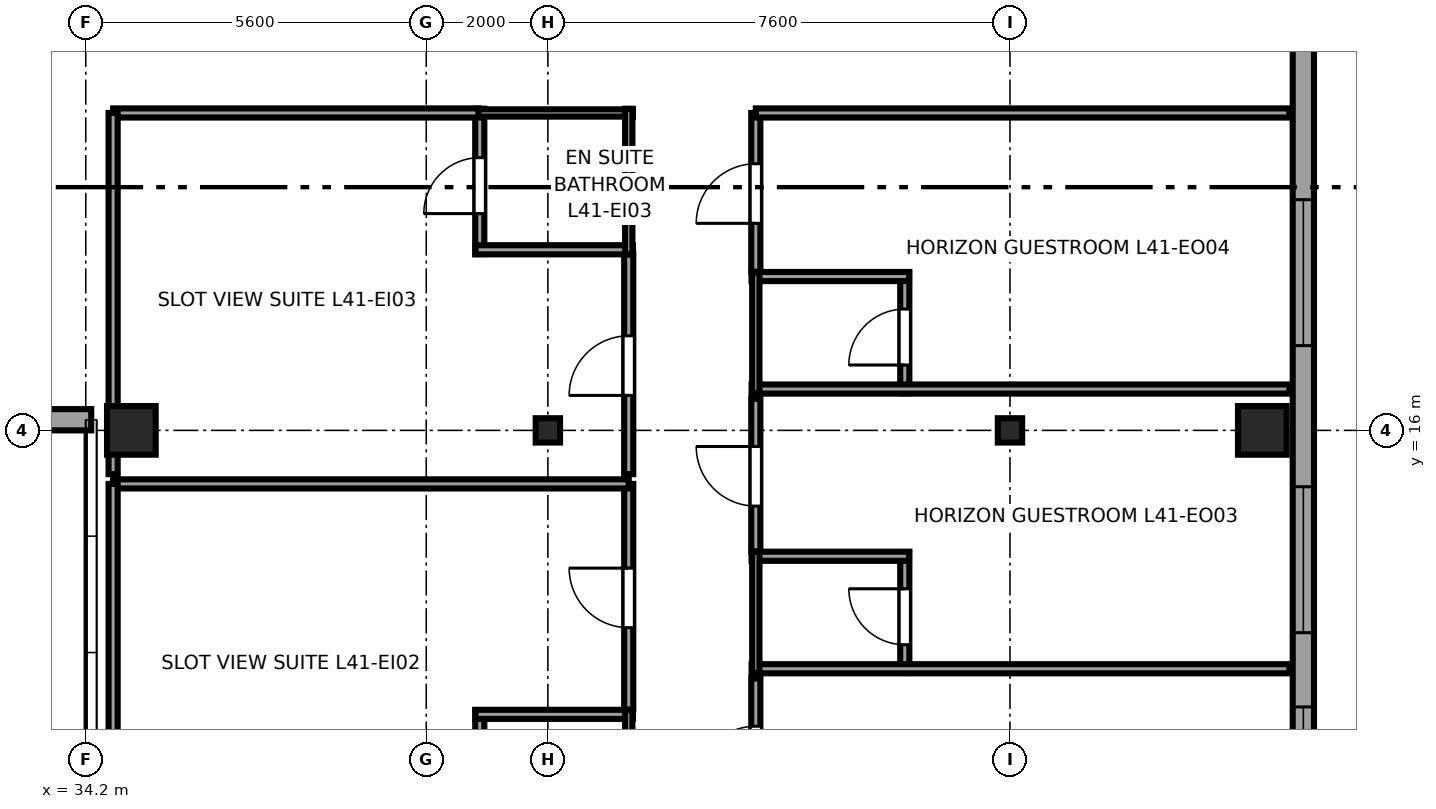
"""IFC4 building model, lengths in metres.
Left out: names, types, materials, properties, quantities, classifications, styles, units other than length and angle.
Written with IfcOpenShell. Run it as: python <this file> out.ifc"""

import sys

from ifc_helpers import new_model, si_unit, direction, frame, frame_2d, origin, origin_2d, place, context, subcontext, project, spatial, rectangle, i_section, extrude, source, transform, mapped, element, fill, save


model = new_model("IFC4")
c1 = context("Model", 3, precision=1e-05, world=origin(), true_north=direction((0.0, 1.0)))
c2 = subcontext(c1, "Body", "Model", "MODEL_VIEW")
j1 = project(units=[si_unit("LENGTHUNIT", "METRE"), si_unit("PLANEANGLEUNIT", "RADIAN")], contexts=[c1])
p1 = place(None, origin())
s1 = spatial("IfcSite", under=j1, at=p1, CompositionType="ELEMENT")
p2 = place(p1, origin())
s2 = spatial("IfcBuilding", under=s1, at=p2, CompositionType="ELEMENT")
p3 = place(p2, frame((0.0, 0.0, 157.7)))
s3 = spatial("IfcBuildingStorey", under=s2, at=p3, CompositionType="ELEMENT", Elevation=157.7)
m1 = source(origin(), c2, "Body", "SweptSolid", [
    extrude(rectangle(XDim=0.8, YDim=0.8, at=origin_2d()), origin(), (0.0, 0.0, 1.0), 3.55),
])
p4 = place(p3, frame((34.95, 16.0, 0.0), z_axis=(0.0, 0.0, 1.0), x_axis=(1.0, 0.0, 0.0)))
e1 = element("IfcColumn", 1, at=p4, inside=s3, PredefinedType="COLUMN", context=c2, shape_type="MappedRepresentation", body=[
    mapped(m1, transform((0.0, 0.0, 0.0), x_axis=(1.0, 0.0, 0.0), y_axis=(0.0, 1.0, 0.0), z_axis=(0.0, 0.0, 1.0), scale=1.0)),
])
m2 = source(origin(), c2, "Body", "SweptSolid", [
    extrude(i_section(OverallWidth=0.4, OverallDepth=0.4, WebThickness=0.02, FlangeThickness=0.035, at=origin_2d()), origin(), (0.0, 0.0, 1.0), 3.55),
])
for number, where, z_axis, x_axis in (
    (2, (41.8, 16.0, 0.0), (0.0, 0.0, 1.0), (1.0, 0.0, 0.0)),
    (3, (49.4, 16.0, 0.0), (0.0, 0.0, 1.0), (1.0, 0.0, 0.0)),
):
    element("IfcColumn", number, at=place(p3, frame(where, z_axis=z_axis, x_axis=x_axis)), inside=s3, PredefinedType="COLUMN", context=c2, shape_type="MappedRepresentation", body=[
        mapped(m2, transform((0.0, 0.0, 0.0), x_axis=(1.0, 0.0, 0.0), y_axis=(0.0, 1.0, 0.0), z_axis=(0.0, 0.0, 1.0), scale=1.0)),
    ])
p5 = place(p3, frame((53.55, 16.0, 0.0), z_axis=(0.0, 0.0, 1.0), x_axis=(1.0, 0.0, 0.0)))
e4 = element("IfcColumn", 4, at=p5, inside=s3, PredefinedType="COLUMN", context=c2, shape_type="MappedRepresentation", body=[
    mapped(m1, transform((0.0, 0.0, 0.0), x_axis=(1.0, 0.0, 0.0), y_axis=(0.0, 1.0, 0.0), z_axis=(0.0, 0.0, 1.0), scale=1.0)),
])
p6 = place(p3, frame((22.71, 16.175, 0.0), z_axis=(0.0, 0.0, 1.0), x_axis=(1.0, 0.0, 0.0)))
e5 = element("IfcWall", 5, at=p6, inside=s3, PredefinedType="SOLIDWALL", context=c2, shape_type="SweptSolid", body=[
    extrude(rectangle(XDim=11.58, YDim=0.35, at=frame_2d((5.79, 0.0))), origin(), (0.0, 0.0, 1.0), 2.758),
])
p7 = place(p6, frame((1.995, 0.0, 0.68)))
e6 = element("IfcOpeningElement", 6, at=p7, cuts=e5, PredefinedType="OPENING", context=c2, shape_type="SweptSolid", body=[
    extrude(rectangle(XDim=2.4, YDim=1.9, at=frame_2d((1.2, 0.95))), frame((0.0, 0.185, 0.0), z_axis=(0.0, -1.0, 0.0), x_axis=(1.0, 0.0, 0.0)), (0.0, 0.0, 1.0), 0.37),
])
p8 = place(p6, frame((7.185, 0.0, 0.68)))
e7 = element("IfcOpeningElement", 7, at=p8, cuts=e5, PredefinedType="OPENING", context=c2, shape_type="SweptSolid", body=[
    extrude(rectangle(XDim=2.4, YDim=1.9, at=frame_2d((1.2, 0.95))), frame((0.0, 0.185, 0.0), z_axis=(0.0, -1.0, 0.0), x_axis=(1.0, 0.0, 0.0)), (0.0, 0.0, 1.0), 0.37),
])
p9 = place(p3, frame((54.225, 7.017, 0.0), z_axis=(0.0, 0.0, 1.0), x_axis=(0.0, 1.0, 0.0)))
e8 = element("IfcWall", 8, at=p9, inside=s3, PredefinedType="SOLIDWALL", context=c2, shape_type="SweptSolid", body=[
    extrude(rectangle(XDim=34.566, YDim=0.35, at=frame_2d((17.283, 0.0))), origin(), (0.0, 0.0, 1.0), 3.37),
])
p10 = place(p9, frame((2.035, 0.0, 0.68)))
e9 = element("IfcOpeningElement", 9, at=p10, cuts=e8, PredefinedType="OPENING", context=c2, shape_type="SweptSolid", body=[
    extrude(rectangle(XDim=2.4, YDim=1.9, at=frame_2d((1.2, 0.95))), frame((0.0, 0.185, 0.0), z_axis=(0.0, -1.0, 0.0), x_axis=(1.0, 0.0, 0.0)), (0.0, 0.0, 1.0), 0.37),
])
p11 = place(p9, frame((5.656, 0.0, 0.68)))
e10 = element("IfcOpeningElement", 10, at=p11, cuts=e8, PredefinedType="OPENING", context=c2, shape_type="SweptSolid", body=[
    extrude(rectangle(XDim=2.4, YDim=1.9, at=frame_2d((1.2, 0.95))), frame((0.0, 0.185, 0.0), z_axis=(0.0, -1.0, 0.0), x_axis=(1.0, 0.0, 0.0)), (0.0, 0.0, 1.0), 0.37),
])
p12 = place(p9, frame((10.377, 0.0, 0.68)))
e11 = element("IfcOpeningElement", 11, at=p12, cuts=e8, PredefinedType="OPENING", context=c2, shape_type="SweptSolid", body=[
    extrude(rectangle(XDim=2.4, YDim=1.9, at=frame_2d((1.2, 0.95))), frame((0.0, 0.185, 0.0), z_axis=(0.0, -1.0, 0.0), x_axis=(1.0, 0.0, 0.0)), (0.0, 0.0, 1.0), 0.37),
])
p13 = place(p9, frame((22.339, 0.0, 0.68)))
e12 = element("IfcOpeningElement", 12, at=p13, cuts=e8, PredefinedType="OPENING", context=c2, shape_type="SweptSolid", body=[
    extrude(rectangle(XDim=2.4, YDim=1.9, at=frame_2d((1.2, 0.95))), frame((0.0, 0.185, 0.0), z_axis=(0.0, -1.0, 0.0), x_axis=(1.0, 0.0, 0.0)), (0.0, 0.0, 1.0), 0.37),
])
p14 = place(p9, frame((30.68, 0.0, 0.68)))
e13 = element("IfcOpeningElement", 13, at=p14, cuts=e8, PredefinedType="OPENING", context=c2, shape_type="SweptSolid", body=[
    extrude(rectangle(XDim=2.4, YDim=1.9, at=frame_2d((1.2, 0.95))), frame((0.0, 0.185, 0.0), z_axis=(0.0, -1.0, 0.0), x_axis=(1.0, 0.0, 0.0)), (0.0, 0.0, 1.0), 0.37),
])
p15 = place(p3, frame((40.68, 9.01, 0.0), z_axis=(0.0, 0.0, 1.0), x_axis=(0.0, 1.0, 0.0)))
e14 = element("IfcWall", 14, at=p15, inside=s3, PredefinedType="PARTITIONING", context=c2, shape_type="SweptSolid", body=[
    extrude(rectangle(XDim=2.39, YDim=0.15, at=frame_2d((1.195, 0.0))), origin(), (0.0, 0.0, 1.0), 3.37),
])
p16 = place(p15, frame((0.665, 0.0, 0.0)))
e15 = element("IfcOpeningElement", 15, at=p16, cuts=e14, PredefinedType="OPENING", context=c2, shape_type="SweptSolid", body=[
    extrude(rectangle(XDim=0.92, YDim=2.01, at=frame_2d((0.46, 1.005))), frame((0.0, 0.085, 0.0), z_axis=(0.0, -1.0, 0.0), x_axis=(1.0, 0.0, 0.0)), (0.0, 0.0, 1.0), 0.17),
])
p17 = place(p3, frame((40.61, 11.33, 0.0), z_axis=(0.0, 0.0, 1.0), x_axis=(1.0, 0.0, 0.0)))
e16 = element("IfcWall", 16, at=p17, inside=s3, PredefinedType="PARTITIONING", context=c2, shape_type="SweptSolid", body=[
    extrude(rectangle(XDim=2.59, YDim=0.15, at=frame_2d((1.295, 0.0))), origin(), (0.0, 0.0, 1.0), 3.37),
])
p18 = place(p3, frame((43.13, 9.01, 0.0), z_axis=(0.0, 0.0, 1.0), x_axis=(0.0, 1.0, 0.0)))
e17 = element("IfcWall", 17, at=p18, inside=s3, PredefinedType="PLUMBINGWALL", context=c2, shape_type="SweptSolid", body=[
    extrude(rectangle(XDim=2.39, YDim=0.12, at=frame_2d((1.195, 0.0))), origin(), (0.0, 0.0, 1.0), 3.37),
])
p19 = place(p3, frame((40.68, 18.9, 0.0), z_axis=(0.0, 0.0, 1.0), x_axis=(0.0, 1.0, 0.0)))
e18 = element("IfcWall", 18, at=p19, inside=s3, PredefinedType="PARTITIONING", context=c2, shape_type="SweptSolid", body=[
    extrude(rectangle(XDim=2.39, YDim=0.15, at=frame_2d((1.195, 0.0))), origin(), (0.0, 0.0, 1.0), 3.37),
])
p20 = place(p19, frame((0.665, 0.0, 0.0)))
e19 = element("IfcOpeningElement", 19, at=p20, cuts=e18, PredefinedType="OPENING", context=c2, shape_type="SweptSolid", body=[
    extrude(rectangle(XDim=0.92, YDim=2.01, at=frame_2d((0.46, 1.005))), frame((0.0, 0.085, 0.0), z_axis=(0.0, -1.0, 0.0), x_axis=(1.0, 0.0, 0.0)), (0.0, 0.0, 1.0), 0.17),
])
p21 = place(p3, frame((40.61, 18.97, 0.0), z_axis=(0.0, 0.0, 1.0), x_axis=(1.0, 0.0, 0.0)))
e20 = element("IfcWall", 20, at=p21, inside=s3, PredefinedType="PARTITIONING", context=c2, shape_type="SweptSolid", body=[
    extrude(rectangle(XDim=2.59, YDim=0.15, at=frame_2d((1.295, 0.0))), origin(), (0.0, 0.0, 1.0), 3.37),
])
p22 = place(p3, frame((40.61, 21.22, 0.0), z_axis=(0.0, 0.0, 1.0), x_axis=(1.0, 0.0, 0.0)))
e21 = element("IfcWall", 21, at=p22, inside=s3, PredefinedType="PLUMBINGWALL", context=c2, shape_type="SweptSolid", body=[
    extrude(rectangle(XDim=2.59, YDim=0.12, at=frame_2d((1.295, 0.0))), origin(), (0.0, 0.0, 1.0), 3.37),
])
p23 = place(p3, frame((43.13, 18.9, 0.0), z_axis=(0.0, 0.0, 1.0), x_axis=(0.0, 1.0, 0.0)))
e22 = element("IfcWall", 22, at=p23, inside=s3, PredefinedType="PLUMBINGWALL", context=c2, shape_type="SweptSolid", body=[
    extrude(rectangle(XDim=2.39, YDim=0.12, at=frame_2d((1.195, 0.0))), origin(), (0.0, 0.0, 1.0), 3.37),
])
p24 = place(p3, frame((47.67, 12.01, 0.0), z_axis=(0.0, 0.0, 1.0), x_axis=(0.0, 1.0, 0.0)))
e23 = element("IfcWall", 23, at=p24, inside=s3, PredefinedType="PARTITIONING", context=c2, shape_type="SweptSolid", body=[
    extrude(rectangle(XDim=1.99, YDim=0.15, at=frame_2d((0.995, 0.0))), origin(), (0.0, 0.0, 1.0), 3.37),
])
p25 = place(p24, frame((0.465, 0.0, 0.0)))
e24 = element("IfcOpeningElement", 24, at=p25, cuts=e23, PredefinedType="OPENING", context=c2, shape_type="SweptSolid", body=[
    extrude(rectangle(XDim=0.92, YDim=2.01, at=frame_2d((0.46, 1.005))), frame((0.0, 0.085, 0.0), z_axis=(0.0, -1.0, 0.0), x_axis=(1.0, 0.0, 0.0)), (0.0, 0.0, 1.0), 0.17),
])
p26 = place(p3, frame((45.15, 12.08, 0.0), z_axis=(0.0, 0.0, 1.0), x_axis=(1.0, 0.0, 0.0)))
e25 = element("IfcWall", 25, at=p26, inside=s3, PredefinedType="PARTITIONING", context=c2, shape_type="SweptSolid", body=[
    extrude(rectangle(XDim=8.845, YDim=0.15, at=frame_2d((4.423, 0.0))), origin(), (0.0, 0.0, 1.0), 3.37),
])
p27 = place(p3, frame((45.15, 13.93, 0.0), z_axis=(0.0, 0.0, 1.0), x_axis=(1.0, 0.0, 0.0)))
e26 = element("IfcWall", 26, at=p27, inside=s3, PredefinedType="PARTITIONING", context=c2, shape_type="SweptSolid", body=[
    extrude(rectangle(XDim=2.59, YDim=0.15, at=frame_2d((1.295, 0.0))), origin(), (0.0, 0.0, 1.0), 3.37),
])
p28 = place(p3, frame((45.22, 12.01, 0.0), z_axis=(0.0, 0.0, 1.0), x_axis=(0.0, 1.0, 0.0)))
e27 = element("IfcWall", 27, at=p28, inside=s3, PredefinedType="PLUMBINGWALL", context=c2, shape_type="SweptSolid", body=[
    extrude(rectangle(XDim=1.99, YDim=0.12, at=frame_2d((0.995, 0.0))), origin(), (0.0, 0.0, 1.0), 3.37),
])
p29 = place(p3, frame((47.67, 16.61, 0.0), z_axis=(0.0, 0.0, 1.0), x_axis=(0.0, 1.0, 0.0)))
e28 = element("IfcWall", 28, at=p29, inside=s3, PredefinedType="PARTITIONING", context=c2, shape_type="SweptSolid", body=[
    extrude(rectangle(XDim=1.99, YDim=0.15, at=frame_2d((0.995, 0.0))), origin(), (0.0, 0.0, 1.0), 3.37),
])
p30 = place(p29, frame((0.465, 0.0, 0.0)))
e29 = element("IfcOpeningElement", 29, at=p30, cuts=e28, PredefinedType="OPENING", context=c2, shape_type="SweptSolid", body=[
    extrude(rectangle(XDim=0.92, YDim=2.01, at=frame_2d((0.46, 1.005))), frame((0.0, 0.085, 0.0), z_axis=(0.0, -1.0, 0.0), x_axis=(1.0, 0.0, 0.0)), (0.0, 0.0, 1.0), 0.17),
])
p31 = place(p3, frame((45.15, 16.68, 0.0), z_axis=(0.0, 0.0, 1.0), x_axis=(1.0, 0.0, 0.0)))
e30 = element("IfcWall", 30, at=p31, inside=s3, PredefinedType="PARTITIONING", context=c2, shape_type="SweptSolid", body=[
    extrude(rectangle(XDim=8.845, YDim=0.15, at=frame_2d((4.423, 0.0))), origin(), (0.0, 0.0, 1.0), 3.37),
])
p32 = place(p3, frame((45.15, 18.53, 0.0), z_axis=(0.0, 0.0, 1.0), x_axis=(1.0, 0.0, 0.0)))
e31 = element("IfcWall", 31, at=p32, inside=s3, PredefinedType="PARTITIONING", context=c2, shape_type="SweptSolid", body=[
    extrude(rectangle(XDim=2.59, YDim=0.15, at=frame_2d((1.295, 0.0))), origin(), (0.0, 0.0, 1.0), 3.37),
])
p33 = place(p3, frame((45.22, 16.61, 0.0), z_axis=(0.0, 0.0, 1.0), x_axis=(0.0, 1.0, 0.0)))
e32 = element("IfcWall", 32, at=p33, inside=s3, PredefinedType="PLUMBINGWALL", context=c2, shape_type="SweptSolid", body=[
    extrude(rectangle(XDim=1.99, YDim=0.12, at=frame_2d((0.995, 0.0))), origin(), (0.0, 0.0, 1.0), 3.37),
])
p34 = place(p3, frame((43.13, 11.41, 0.0), z_axis=(0.0, 0.0, 1.0), x_axis=(0.0, 1.0, 0.0)))
e33 = element("IfcWall", 33, at=p34, inside=s3, PredefinedType="PARTITIONING", context=c2, shape_type="SweptSolid", body=[
    extrude(rectangle(XDim=3.71, YDim=0.15, at=frame_2d((1.855, 0.0))), origin(), (0.0, 0.0, 1.0), 3.37),
])
p35 = place(p34, frame((1.345, 0.0, 0.0)))
e34 = element("IfcOpeningElement", 34, at=p35, cuts=e33, PredefinedType="OPENING", context=c2, shape_type="SweptSolid", body=[
    extrude(rectangle(XDim=0.98, YDim=2.12, at=frame_2d((0.49, 1.06))), frame((0.0, 0.085, 0.0), z_axis=(0.0, -1.0, 0.0), x_axis=(1.0, 0.0, 0.0)), (0.0, 0.0, 1.0), 0.17),
])
p36 = place(p3, frame((34.65, 15.12, 0.0), z_axis=(0.0, 0.0, 1.0), x_axis=(1.0, 0.0, 0.0)))
e35 = element("IfcWall", 35, at=p36, inside=s3, PredefinedType="PARTITIONING", context=c2, shape_type="SweptSolid", body=[
    extrude(rectangle(XDim=8.48, YDim=0.15, at=frame_2d((4.24, 0.0))), origin(), (0.0, 0.0, 1.0), 3.37),
])
p37 = place(p3, frame((34.65, 9.08, 0.0), z_axis=(0.0, 0.0, 1.0), x_axis=(0.0, 1.0, 0.0)))
e36 = element("IfcWall", 36, at=p37, inside=s3, PredefinedType="PARTITIONING", context=c2, shape_type="SweptSolid", body=[
    extrude(rectangle(XDim=6.04, YDim=0.15, at=frame_2d((3.02, 0.0))), origin(), (0.0, 0.0, 1.0), 3.37),
])
p38 = place(p3, frame((43.13, 15.28, 0.0), z_axis=(0.0, 0.0, 1.0), x_axis=(0.0, 1.0, 0.0)))
e37 = element("IfcWall", 37, at=p38, inside=s3, PredefinedType="PARTITIONING", context=c2, shape_type="SweptSolid", body=[
    extrude(rectangle(XDim=3.61, YDim=0.15, at=frame_2d((1.805, 0.0))), origin(), (0.0, 0.0, 1.0), 3.37),
])
p39 = place(p38, frame((1.295, 0.0, 0.0)))
e38 = element("IfcOpeningElement", 38, at=p39, cuts=e37, PredefinedType="OPENING", context=c2, shape_type="SweptSolid", body=[
    extrude(rectangle(XDim=0.98, YDim=2.12, at=frame_2d((0.49, 1.06))), frame((0.0, 0.085, 0.0), z_axis=(0.0, -1.0, 0.0), x_axis=(1.0, 0.0, 0.0)), (0.0, 0.0, 1.0), 0.17),
])
p40 = place(p3, frame((34.65, 21.22, 0.0), z_axis=(0.0, 0.0, 1.0), x_axis=(1.0, 0.0, 0.0)))
e39 = element("IfcWall", 39, at=p40, inside=s3, PredefinedType="PARTITIONING", context=c2, shape_type="SweptSolid", body=[
    extrude(rectangle(XDim=6.01, YDim=0.15, at=frame_2d((3.005, 0.0))), origin(), (0.0, 0.0, 1.0), 3.37),
])
p41 = place(p3, frame((34.65, 15.28, 0.0), z_axis=(0.0, 0.0, 1.0), x_axis=(0.0, 1.0, 0.0)))
e40 = element("IfcWall", 40, at=p41, inside=s3, PredefinedType="PARTITIONING", context=c2, shape_type="SweptSolid", body=[
    extrude(rectangle(XDim=5.94, YDim=0.15, at=frame_2d((2.97, 0.0))), origin(), (0.0, 0.0, 1.0), 3.37),
])
p42 = place(p3, frame((45.22, 9.41, 0.0), z_axis=(0.0, 0.0, 1.0), x_axis=(0.0, 1.0, 0.0)))
e41 = element("IfcWall", 41, at=p42, inside=s3, PredefinedType="PARTITIONING", context=c2, shape_type="SweptSolid", body=[
    extrude(rectangle(XDim=2.51, YDim=0.15, at=frame_2d((1.255, 0.0))), origin(), (0.0, 0.0, 1.0), 3.37),
])
p43 = place(p42, frame((0.745, 0.0, 0.0)))
e42 = element("IfcOpeningElement", 42, at=p43, cuts=e41, PredefinedType="OPENING", context=c2, shape_type="SweptSolid", body=[
    extrude(rectangle(XDim=0.98, YDim=2.12, at=frame_2d((0.49, 1.06))), frame((0.0, 0.085, 0.0), z_axis=(0.0, -1.0, 0.0), x_axis=(1.0, 0.0, 0.0)), (0.0, 0.0, 1.0), 0.17),
])
p44 = place(p3, frame((45.22, 14.01, 0.0), z_axis=(0.0, 0.0, 1.0), x_axis=(0.0, 1.0, 0.0)))
e43 = element("IfcWall", 43, at=p44, inside=s3, PredefinedType="PARTITIONING", context=c2, shape_type="SweptSolid", body=[
    extrude(rectangle(XDim=2.51, YDim=0.15, at=frame_2d((1.255, 0.0))), origin(), (0.0, 0.0, 1.0), 3.37),
])
p45 = place(p44, frame((0.745, 0.0, 0.0)))
e44 = element("IfcOpeningElement", 44, at=p45, cuts=e43, PredefinedType="OPENING", context=c2, shape_type="SweptSolid", body=[
    extrude(rectangle(XDim=0.98, YDim=2.12, at=frame_2d((0.49, 1.06))), frame((0.0, 0.085, 0.0), z_axis=(0.0, -1.0, 0.0), x_axis=(1.0, 0.0, 0.0)), (0.0, 0.0, 1.0), 0.17),
])
p46 = place(p3, frame((45.22, 18.61, 0.0), z_axis=(0.0, 0.0, 1.0), x_axis=(0.0, 1.0, 0.0)))
e45 = element("IfcWall", 45, at=p46, inside=s3, PredefinedType="PARTITIONING", context=c2, shape_type="SweptSolid", body=[
    extrude(rectangle(XDim=2.61, YDim=0.15, at=frame_2d((1.305, 0.0))), origin(), (0.0, 0.0, 1.0), 3.37),
])
p47 = place(p46, frame((0.795, 0.0, 0.0)))
e46 = element("IfcOpeningElement", 46, at=p47, cuts=e45, PredefinedType="OPENING", context=c2, shape_type="SweptSolid", body=[
    extrude(rectangle(XDim=0.98, YDim=2.12, at=frame_2d((0.49, 1.06))), frame((0.0, 0.085, 0.0), z_axis=(0.0, -1.0, 0.0), x_axis=(1.0, 0.0, 0.0)), (0.0, 0.0, 1.0), 0.17),
])
p48 = place(p3, frame((45.22, 21.22, 0.0), z_axis=(0.0, 0.0, 1.0), x_axis=(1.0, 0.0, 0.0)))
e47 = element("IfcWall", 47, at=p48, inside=s3, PredefinedType="PARTITIONING", context=c2, shape_type="SweptSolid", body=[
    extrude(rectangle(XDim=8.775, YDim=0.15, at=frame_2d((4.388, 0.0))), origin(), (0.0, 0.0, 1.0), 3.37),
])
m3 = source(origin(), c2, "Body", "SweptSolid", [
    extrude(rectangle(XDim=2.4, YDim=1.9, at=frame_2d((1.2, 0.95))), frame((0.0, 0.09, 0.0), z_axis=(0.0, -1.0, 0.0), x_axis=(1.0, 0.0, 0.0)), (0.0, 0.0, 1.0), 0.06),
])
p49 = place(p10, origin())
e48 = element("IfcWindow", 48, at=p49, inside=s3, PartitioningType="TRIPLE_PANEL_HORIZONTAL", PredefinedType="WINDOW", context=c2, shape_type="MappedRepresentation", body=[
    mapped(m3, transform((0.0, 0.0, 0.0), x_axis=(1.0, 0.0, 0.0), y_axis=(0.0, 1.0, 0.0), z_axis=(0.0, 0.0, 1.0), scale=1.0)),
])
fill(e9, e48)
p50 = place(p11, origin())
e49 = element("IfcWindow", 49, at=p50, inside=s3, PartitioningType="TRIPLE_PANEL_HORIZONTAL", PredefinedType="WINDOW", context=c2, shape_type="MappedRepresentation", body=[
    mapped(m3, transform((0.0, 0.0, 0.0), x_axis=(1.0, 0.0, 0.0), y_axis=(0.0, 1.0, 0.0), z_axis=(0.0, 0.0, 1.0), scale=1.0)),
])
fill(e10, e49)
p51 = place(p12, origin())
e50 = element("IfcWindow", 50, at=p51, inside=s3, PartitioningType="TRIPLE_PANEL_HORIZONTAL", PredefinedType="WINDOW", context=c2, shape_type="MappedRepresentation", body=[
    mapped(m3, transform((0.0, 0.0, 0.0), x_axis=(1.0, 0.0, 0.0), y_axis=(0.0, 1.0, 0.0), z_axis=(0.0, 0.0, 1.0), scale=1.0)),
])
fill(e11, e50)
m4 = source(origin(), c2, "Body", "SweptSolid", [
    extrude(rectangle(XDim=0.92, YDim=2.01, at=frame_2d((0.46, 1.005))), frame((0.0, 0.025, 0.0), z_axis=(0.0, -1.0, 0.0), x_axis=(1.0, 0.0, 0.0)), (0.0, 0.0, 1.0), 0.05),
])
p52 = place(p20, origin())
e51 = element("IfcDoor", 51, at=p52, inside=s3, OperationType="SINGLE_SWING_LEFT", PredefinedType="DOOR", context=c2, shape_type="MappedRepresentation", body=[
    mapped(m4, transform((0.0, 0.0, 0.0), x_axis=(1.0, 0.0, 0.0), y_axis=(0.0, 1.0, 0.0), z_axis=(0.0, 0.0, 1.0), scale=1.0)),
])
fill(e19, e51)
p53 = place(p25, origin())
e52 = element("IfcDoor", 52, at=p53, inside=s3, OperationType="SINGLE_SWING_RIGHT", PredefinedType="DOOR", context=c2, shape_type="MappedRepresentation", body=[
    mapped(m4, transform((0.0, 0.0, 0.0), x_axis=(1.0, 0.0, 0.0), y_axis=(0.0, 1.0, 0.0), z_axis=(0.0, 0.0, 1.0), scale=1.0)),
])
fill(e24, e52)
p54 = place(p30, origin())
e53 = element("IfcDoor", 53, at=p54, inside=s3, OperationType="SINGLE_SWING_LEFT", PredefinedType="DOOR", context=c2, shape_type="MappedRepresentation", body=[
    mapped(m4, transform((0.0, 0.0, 0.0), x_axis=(1.0, 0.0, 0.0), y_axis=(0.0, 1.0, 0.0), z_axis=(0.0, 0.0, 1.0), scale=1.0)),
])
fill(e29, e53)
m5 = source(origin(), c2, "Body", "SweptSolid", [
    extrude(rectangle(XDim=0.98, YDim=2.12, at=frame_2d((0.49, 1.06))), frame((0.0, 0.025, 0.0), z_axis=(0.0, -1.0, 0.0), x_axis=(1.0, 0.0, 0.0)), (0.0, 0.0, 1.0), 0.05),
])
p55 = place(p35, origin())
e54 = element("IfcDoor", 54, at=p55, inside=s3, OperationType="SINGLE_SWING_RIGHT", PredefinedType="DOOR", context=c2, shape_type="MappedRepresentation", body=[
    mapped(m5, transform((0.0, 0.0, 0.0), x_axis=(1.0, 0.0, 0.0), y_axis=(0.0, 1.0, 0.0), z_axis=(0.0, 0.0, 1.0), scale=1.0)),
])
fill(e34, e54)
p56 = place(p39, origin())
e55 = element("IfcDoor", 55, at=p56, inside=s3, OperationType="SINGLE_SWING_LEFT", PredefinedType="DOOR", context=c2, shape_type="MappedRepresentation", body=[
    mapped(m5, transform((0.0, 0.0, 0.0), x_axis=(1.0, 0.0, 0.0), y_axis=(0.0, 1.0, 0.0), z_axis=(0.0, 0.0, 1.0), scale=1.0)),
])
fill(e38, e55)
p57 = place(p43, origin())
e56 = element("IfcDoor", 56, at=p57, inside=s3, OperationType="SINGLE_SWING_LEFT", PredefinedType="DOOR", context=c2, shape_type="MappedRepresentation", body=[
    mapped(m5, transform((0.0, 0.0, 0.0), x_axis=(1.0, 0.0, 0.0), y_axis=(0.0, 1.0, 0.0), z_axis=(0.0, 0.0, 1.0), scale=1.0)),
])
fill(e42, e56)
p58 = place(p45, origin())
e57 = element("IfcDoor", 57, at=p58, inside=s3, OperationType="SINGLE_SWING_RIGHT", PredefinedType="DOOR", context=c2, shape_type="MappedRepresentation", body=[
    mapped(m5, transform((0.0, 0.0, 0.0), x_axis=(1.0, 0.0, 0.0), y_axis=(0.0, 1.0, 0.0), z_axis=(0.0, 0.0, 1.0), scale=1.0)),
])
fill(e44, e57)
p59 = place(p47, origin())
e58 = element("IfcDoor", 58, at=p59, inside=s3, OperationType="SINGLE_SWING_LEFT", PredefinedType="DOOR", context=c2, shape_type="MappedRepresentation", body=[
    mapped(m5, transform((0.0, 0.0, 0.0), x_axis=(1.0, 0.0, 0.0), y_axis=(0.0, 1.0, 0.0), z_axis=(0.0, 0.0, 1.0), scale=1.0)),
])
fill(e46, e58)
save(model, sys.argv[1])
